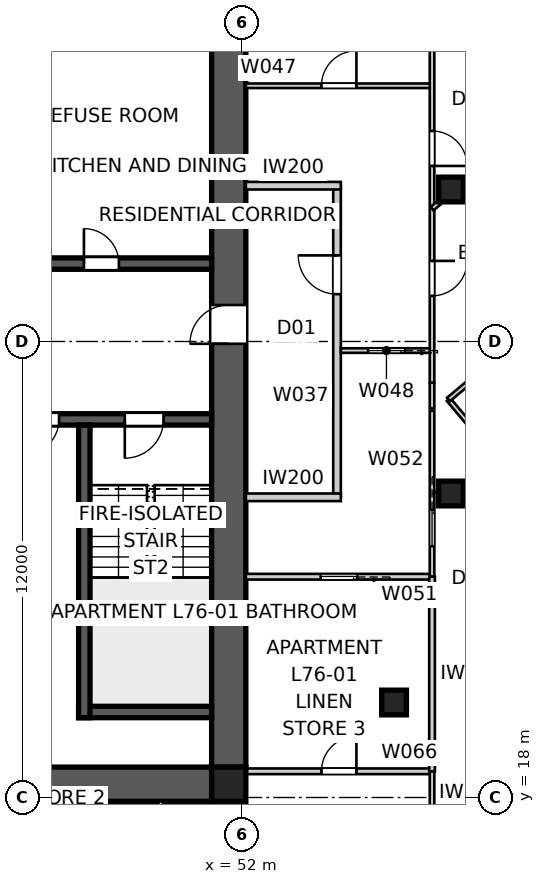
"""IFC4 building model, lengths in metres.
Left out: names, types, materials, properties, quantities, classifications, styles, units other than length and angle.
Written with IfcOpenShell. Run it as: python <this file> out.ifc"""

import sys

from ifc_helpers import new_model, si_unit, direction, frame, frame_2d, origin, origin_2d, place, context, subcontext, project, spatial, polyline, rectangle, outline, extrude, element, fill, save


model = new_model("IFC4")
c1 = context("Model", 3, precision=1e-05, world=origin(), true_north=direction((0.0, 1.0)))
c2 = subcontext(c1, "Body", "Model", "MODEL_VIEW")
j1 = project(units=[si_unit("LENGTHUNIT", "METRE"), si_unit("PLANEANGLEUNIT", "RADIAN")], contexts=[c1])
p1 = place(None, origin())
s1 = spatial("IfcSite", under=j1, at=p1, CompositionType="ELEMENT")
p2 = place(p1, origin())
s2 = spatial("IfcBuilding", under=s1, at=p2, CompositionType="ELEMENT")
p3 = place(p2, frame((0.0, 0.0, 276.0)))
s3 = spatial("IfcBuildingStorey", under=s2, at=p3, CompositionType="ELEMENT", Elevation=276.0)
p4 = place(p3, frame((51.2, 18.35, 0.0), z_axis=(0.0, 0.0, 1.0), x_axis=(-1.0, 0.0, 0.0)))
e1 = element("IfcWall", 1, at=p4, inside=s3, PredefinedType="SHEAR", context=c2, shape_type="SweptSolid", body=[
    extrude(outline(polyline([(0.0, -0.45), (22.4, -0.45), (22.4, -0.025), (22.85, -0.025), (22.85, 0.025), (22.4, 0.025), (22.4, 0.45), (0.0, 0.45), (0.0, 0.025), (-0.45, 0.025), (-0.45, -0.025), (0.0, -0.025), (0.0, -0.45)])), origin(), (0.0, 0.0, 1.0), 3.4),
])
p5 = place(p3, frame((51.65, 18.8, 0.0), z_axis=(0.0, 0.0, 1.0), x_axis=(0.0, 1.0, 0.0)))
e2 = element("IfcWall", 2, at=p5, inside=s3, PredefinedType="SHEAR", context=c2, shape_type="SweptSolid", body=[
    extrude(outline(polyline([(0.0, -0.45), (22.4, -0.45), (22.4, -0.025), (22.85, -0.025), (22.85, 0.025), (22.4, 0.025), (22.4, 0.45), (0.0, 0.45), (0.0, 0.025), (-0.45, 0.025), (-0.45, -0.025), (0.0, -0.025), (0.0, -0.45)])), origin(), (0.0, 0.0, 1.0), 3.4),
])
p6 = place(p5, frame((11.14, 0.0, 0.0)))
e3 = element("IfcOpeningElement", 3, at=p6, cuts=e2, PredefinedType="OPENING", context=c2, shape_type="SweptSolid", body=[
    extrude(rectangle(XDim=1.02, YDim=2.4, at=frame_2d((0.51, 1.2))), frame((0.0, 0.46, 0.0), z_axis=(0.0, -1.0, 0.0), x_axis=(1.0, 0.0, 0.0)), (0.0, 0.0, 1.0), 0.92),
])
p7 = place(p3, frame((28.8, 32.05, 0.0), z_axis=(0.0, 0.0, 1.0), x_axis=(1.0, 0.0, 0.0)))
e4 = element("IfcWall", 4, at=p7, inside=s3, PredefinedType="SHEAR", context=c2, shape_type="SweptSolid", body=[
    extrude(rectangle(XDim=22.4, YDim=0.3, at=frame_2d((11.2, 0.0))), origin(), (0.0, 0.0, 1.0), 3.4),
])
p8 = place(p7, frame((19.04, 0.0, 0.0)))
e5 = element("IfcOpeningElement", 5, at=p8, cuts=e4, PredefinedType="OPENING", context=c2, shape_type="SweptSolid", body=[
    extrude(rectangle(XDim=0.92, YDim=2.1, at=frame_2d((0.46, 1.05))), frame((0.0, 0.16, 0.0), z_axis=(0.0, -1.0, 0.0), x_axis=(1.0, 0.0, 0.0)), (0.0, 0.0, 1.0), 0.32),
])
p9 = place(p7, frame((1.265, 0.0, 0.0)))
e6 = element("IfcOpeningElement", 6, at=p9, cuts=e4, PredefinedType="OPENING", context=c2, shape_type="SweptSolid", body=[
    extrude(rectangle(XDim=1.02, YDim=2.1, at=frame_2d((0.51, 1.05))), frame((0.0, 0.16, 0.0), z_axis=(0.0, -1.0, 0.0), x_axis=(1.0, 0.0, 0.0)), (0.0, 0.0, 1.0), 0.32),
])
p10 = place(p7, frame((4.015, 0.0, 0.0)))
e7 = element("IfcOpeningElement", 7, at=p10, cuts=e4, PredefinedType="OPENING", context=c2, shape_type="SweptSolid", body=[
    extrude(rectangle(XDim=0.92, YDim=2.1, at=frame_2d((0.46, 1.05))), frame((0.0, 0.16, 0.0), z_axis=(0.0, -1.0, 0.0), x_axis=(1.0, 0.0, 0.0)), (0.0, 0.0, 1.0), 0.32),
])
p11 = place(p7, frame((6.115, 0.0, 0.0)))
e8 = element("IfcOpeningElement", 8, at=p11, cuts=e4, PredefinedType="OPENING", context=c2, shape_type="SweptSolid", body=[
    extrude(rectangle(XDim=0.92, YDim=2.1, at=frame_2d((0.46, 1.05))), frame((0.0, 0.16, 0.0), z_axis=(0.0, -1.0, 0.0), x_axis=(1.0, 0.0, 0.0)), (0.0, 0.0, 1.0), 0.32),
])
p12 = place(p7, frame((9.79, 0.0, 0.0)))
e9 = element("IfcOpeningElement", 9, at=p12, cuts=e4, PredefinedType="OPENING", context=c2, shape_type="SweptSolid", body=[
    extrude(rectangle(XDim=0.92, YDim=2.1, at=frame_2d((0.46, 1.05))), frame((0.0, 0.16, 0.0), z_axis=(0.0, -1.0, 0.0), x_axis=(1.0, 0.0, 0.0)), (0.0, 0.0, 1.0), 0.32),
])
p13 = place(p7, frame((12.05, 0.0, 0.0)))
e10 = element("IfcOpeningElement", 10, at=p13, cuts=e4, PredefinedType="OPENING", context=c2, shape_type="SweptSolid", body=[
    extrude(rectangle(XDim=1.1, YDim=2.1, at=frame_2d((0.55, 1.05))), frame((0.0, 0.16, 0.0), z_axis=(0.0, -1.0, 0.0), x_axis=(1.0, 0.0, 0.0)), (0.0, 0.0, 1.0), 0.32),
])
p14 = place(p7, frame((14.85, 0.0, 0.0)))
e11 = element("IfcOpeningElement", 11, at=p14, cuts=e4, PredefinedType="OPENING", context=c2, shape_type="SweptSolid", body=[
    extrude(rectangle(XDim=1.1, YDim=2.1, at=frame_2d((0.55, 1.05))), frame((0.0, 0.16, 0.0), z_axis=(0.0, -1.0, 0.0), x_axis=(1.0, 0.0, 0.0)), (0.0, 0.0, 1.0), 0.32),
])
p15 = place(p3, frame((51.2, 27.95, 0.0), z_axis=(0.0, 0.0, 1.0), x_axis=(-1.0, 0.0, 0.0)))
e12 = element("IfcWall", 12, at=p15, inside=s3, PredefinedType="SHEAR", context=c2, shape_type="SweptSolid", body=[
    extrude(rectangle(XDim=22.4, YDim=0.3, at=frame_2d((11.2, 0.0))), origin(), (0.0, 0.0, 1.0), 3.4),
])
p16 = place(p15, frame((19.04, 0.0, 0.0)))
e13 = element("IfcOpeningElement", 13, at=p16, cuts=e12, PredefinedType="OPENING", context=c2, shape_type="SweptSolid", body=[
    extrude(rectangle(XDim=0.92, YDim=2.1, at=frame_2d((0.46, 1.05))), frame((0.0, 0.16, 0.0), z_axis=(0.0, -1.0, 0.0), x_axis=(1.0, 0.0, 0.0)), (0.0, 0.0, 1.0), 0.32),
])
p17 = place(p15, frame((1.265, 0.0, 0.0)))
e14 = element("IfcOpeningElement", 14, at=p17, cuts=e12, PredefinedType="OPENING", context=c2, shape_type="SweptSolid", body=[
    extrude(rectangle(XDim=1.02, YDim=2.1, at=frame_2d((0.51, 1.05))), frame((0.0, 0.16, 0.0), z_axis=(0.0, -1.0, 0.0), x_axis=(1.0, 0.0, 0.0)), (0.0, 0.0, 1.0), 0.32),
])
p18 = place(p15, frame((4.015, 0.0, 0.0)))
e15 = element("IfcOpeningElement", 15, at=p18, cuts=e12, PredefinedType="OPENING", context=c2, shape_type="SweptSolid", body=[
    extrude(rectangle(XDim=0.92, YDim=2.1, at=frame_2d((0.46, 1.05))), frame((0.0, 0.16, 0.0), z_axis=(0.0, -1.0, 0.0), x_axis=(1.0, 0.0, 0.0)), (0.0, 0.0, 1.0), 0.32),
])
p19 = place(p15, frame((9.34, 0.0, 0.0)))
e16 = element("IfcOpeningElement", 16, at=p19, cuts=e12, PredefinedType="OPENING", context=c2, shape_type="SweptSolid", body=[
    extrude(rectangle(XDim=0.92, YDim=2.1, at=frame_2d((0.46, 1.05))), frame((0.0, 0.16, 0.0), z_axis=(0.0, -1.0, 0.0), x_axis=(1.0, 0.0, 0.0)), (0.0, 0.0, 1.0), 0.32),
])
p20 = place(p15, frame((7.015, 0.0, 0.0)))
e17 = element("IfcOpeningElement", 17, at=p20, cuts=e12, PredefinedType="OPENING", context=c2, shape_type="SweptSolid", body=[
    extrude(rectangle(XDim=0.92, YDim=2.1, at=frame_2d((0.46, 1.05))), frame((0.0, 0.16, 0.0), z_axis=(0.0, -1.0, 0.0), x_axis=(1.0, 0.0, 0.0)), (0.0, 0.0, 1.0), 0.32),
])
p21 = place(p15, frame((12.05, 0.0, 0.0)))
e18 = element("IfcOpeningElement", 18, at=p21, cuts=e12, PredefinedType="OPENING", context=c2, shape_type="SweptSolid", body=[
    extrude(rectangle(XDim=1.1, YDim=2.1, at=frame_2d((0.55, 1.05))), frame((0.0, 0.16, 0.0), z_axis=(0.0, -1.0, 0.0), x_axis=(1.0, 0.0, 0.0)), (0.0, 0.0, 1.0), 0.32),
])
p22 = place(p15, frame((14.85, 0.0, 0.0)))
e19 = element("IfcOpeningElement", 19, at=p22, cuts=e12, PredefinedType="OPENING", context=c2, shape_type="SweptSolid", body=[
    extrude(rectangle(XDim=1.1, YDim=2.1, at=frame_2d((0.55, 1.05))), frame((0.0, 0.16, 0.0), z_axis=(0.0, -1.0, 0.0), x_axis=(1.0, 0.0, 0.0)), (0.0, 0.0, 1.0), 0.32),
])
p23 = place(p3, frame((47.85, 27.8, 0.0), z_axis=(0.0, 0.0, 1.0), x_axis=(0.0, -1.0, 0.0)))
e20 = element("IfcWall", 20, at=p23, inside=s3, PredefinedType="SHEAR", context=c2, shape_type="SweptSolid", body=[
    extrude(rectangle(XDim=7.7, YDim=0.3, at=frame_2d((3.85, 0.0))), origin(), (0.0, 0.0, 1.0), 3.4),
])
p24 = place(p3, frame((51.2, 20.25, 0.0), z_axis=(0.0, 0.0, 1.0), x_axis=(-1.0, 0.0, 0.0)))
e21 = element("IfcWall", 21, at=p24, inside=s3, PredefinedType="SHEAR", context=c2, shape_type="SweptSolid", body=[
    extrude(rectangle(XDim=3.5, YDim=0.3, at=frame_2d((1.75, 0.0))), origin(), (0.0, 0.0, 1.0), 3.4),
])
p25 = place(p3, frame((51.65, 18.35, 0.0), z_axis=(0.0, 0.0, 1.0), x_axis=(1.0, 0.0, 0.0)))
e22 = element("IfcColumn", 22, at=p25, inside=s3, PredefinedType="COLUMN", context=c2, shape_type="SweptSolid", body=[
    extrude(rectangle(XDim=0.9, YDim=0.9, at=origin_2d()), origin(), (0.0, 0.0, 1.0), 3.4),
])
for number, where, z_axis, x_axis in (
    (23, (57.5, 26.0, 0.0), (0.0, 0.0, 1.0), (1.0, 0.0, 0.0)),
    (24, (57.5, 34.0, 0.0), (0.0, 0.0, 1.0), (1.0, 0.0, 0.0)),
    (25, (56.0, 20.5, 0.0), (0.0, 0.0, 1.0), (1.0, 0.0, 0.0)),
):
    element("IfcColumn", number, at=place(p3, frame(where, z_axis=z_axis, x_axis=x_axis)), inside=s3, PredefinedType="COLUMN", context=c2, shape_type="SweptSolid", body=[
        extrude(rectangle(XDim=0.65, YDim=0.65, at=origin_2d()), origin(), (0.0, 0.0, 1.0), 3.4),
    ])
p26 = place(p3, frame((54.5, 25.9, 0.0), z_axis=(0.0, 0.0, 1.0), x_axis=(0.0, 1.0, 0.0)))
e26 = element("IfcWall", 26, at=p26, inside=s3, PredefinedType="PARTITIONING", context=c2, shape_type="SweptSolid", body=[
    extrude(rectangle(XDim=8.2, YDim=0.2, at=frame_2d((4.1, 0.0))), origin(), (0.0, 0.0, 1.0), 3.25),
])
p27 = place(p26, frame((5.346, 0.0, 0.0)))
e27 = element("IfcOpeningElement", 27, at=p27, cuts=e26, PredefinedType="OPENING", context=c2, shape_type="SweptSolid", body=[
    extrude(rectangle(XDim=1.02, YDim=2.34, at=frame_2d((0.51, 1.17))), frame((0.0, 0.11, 0.0), z_axis=(0.0, -1.0, 0.0), x_axis=(1.0, 0.0, 0.0)), (0.0, 0.0, 1.0), 0.22),
])
for number, where, z_axis, x_axis in (
    (28, (52.1, 34.1, 0.0), (0.0, 0.0, 1.0), (1.0, 0.0, 0.0)),
    (29, (52.1, 25.9, 0.0), (0.0, 0.0, 1.0), (1.0, 0.0, 0.0)),
):
    element("IfcWall", number, at=place(p3, frame(where, z_axis=z_axis, x_axis=x_axis)), inside=s3, PredefinedType="PARTITIONING", context=c2, shape_type="SweptSolid", body=[
        extrude(rectangle(XDim=2.5, YDim=0.2, at=frame_2d((1.25, 0.0))), origin(), (0.0, 0.0, 1.0), 3.25),
    ])
p28 = place(p3, frame((52.1, 36.73, 0.0), z_axis=(0.0, 0.0, 1.0), x_axis=(1.0, 0.0, 0.0)))
e30 = element("IfcWall", 30, at=p28, inside=s3, PredefinedType="PARTITIONING", context=c2, shape_type="SweptSolid", body=[
    extrude(rectangle(XDim=4.9, YDim=0.12, at=frame_2d((2.45, 0.0))), origin(), (0.0, 0.0, 1.0), 3.25),
])
p29 = place(p28, frame((1.99, 0.0, 0.0)))
e31 = element("IfcOpeningElement", 31, at=p29, cuts=e30, PredefinedType="OPENING", context=c2, shape_type="SweptSolid", body=[
    extrude(rectangle(XDim=0.92, YDim=2.34, at=frame_2d((0.46, 1.17))), frame((0.0, 0.07, 0.0), z_axis=(0.0, -1.0, 0.0), x_axis=(1.0, 0.0, 0.0)), (0.0, 0.0, 1.0), 0.14),
])
p30 = place(p3, frame((57.0, 29.761, 0.0), z_axis=(0.0, 0.0, 1.0), x_axis=(-1.0, 0.0, 0.0)))
e32 = element("IfcWall", 32, at=p30, inside=s3, PredefinedType="PARTITIONING", context=c2, shape_type="SweptSolid", body=[
    extrude(rectangle(XDim=2.4, YDim=0.12, at=frame_2d((1.2, 0.0))), origin(), (0.0, 0.0, 1.0), 3.25),
])
p31 = place(p30, frame((0.72, 0.0, 0.0)))
e33 = element("IfcOpeningElement", 33, at=p31, cuts=e32, PredefinedType="OPENING", context=c2, shape_type="SweptSolid", body=[
    extrude(rectangle(XDim=0.96, YDim=2.1, at=frame_2d((0.48, 1.05))), frame((0.0, 0.07, 0.0), z_axis=(0.0, -1.0, 0.0), x_axis=(1.0, 0.0, 0.0)), (0.0, 0.0, 1.0), 0.14),
])
p32 = place(p3, frame((57.0, 41.57, 0.0), z_axis=(0.0, 0.0, 1.0), x_axis=(0.0, -1.0, 0.0)))
e34 = element("IfcWall", 34, at=p32, inside=s3, PredefinedType="PARTITIONING", context=c2, shape_type="SweptSolid", body=[
    extrude(rectangle(XDim=12.656, YDim=0.12, at=frame_2d((6.328, 0.0))), origin(), (0.0, 0.0, 1.0), 2.549),
])
p33 = place(p32, frame((9.449, 0.0, 0.0)))
e35 = element("IfcOpeningElement", 35, at=p33, cuts=e34, PredefinedType="OPENING", context=c2, shape_type="SweptSolid", body=[
    extrude(rectangle(XDim=0.92, YDim=2.34, at=frame_2d((0.46, 1.17))), frame((0.0, 0.07, 0.0), z_axis=(0.0, -1.0, 0.0), x_axis=(1.0, 0.0, 0.0)), (0.0, 0.0, 1.0), 0.14),
])
p34 = place(p32, frame((6.031, 0.0, 0.0)))
e36 = element("IfcOpeningElement", 36, at=p34, cuts=e34, PredefinedType="OPENING", context=c2, shape_type="SweptSolid", body=[
    extrude(rectangle(XDim=0.92, YDim=2.34, at=frame_2d((0.46, 1.17))), frame((0.0, 0.07, 0.0), z_axis=(0.0, -1.0, 0.0), x_axis=(1.0, 0.0, 0.0)), (0.0, 0.0, 1.0), 0.14),
])
p35 = place(p3, frame((57.0, 23.81, 0.0), z_axis=(0.0, 0.0, 1.0), x_axis=(-1.0, 0.0, 0.0)))
e37 = element("IfcWall", 37, at=p35, inside=s3, PredefinedType="SOLIDWALL", context=c2, shape_type="SweptSolid", body=[
    extrude(rectangle(XDim=4.9, YDim=0.15, at=frame_2d((2.45, 0.0))), origin(), (0.0, 0.0, 1.0), 3.25),
])
p36 = place(p35, frame((1.97, 0.0, 0.0)))
e38 = element("IfcOpeningElement", 38, at=p36, cuts=e37, PredefinedType="OPENING", context=c2, shape_type="SweptSolid", body=[
    extrude(rectangle(XDim=0.96, YDim=2.1, at=frame_2d((0.48, 1.05))), frame((0.0, 0.085, 0.0), z_axis=(0.0, -1.0, 0.0), x_axis=(1.0, 0.0, 0.0)), (0.0, 0.0, 1.0), 0.17),
])
p37 = place(p3, frame((57.0, 28.176, 0.0), z_axis=(0.0, 0.0, 1.0), x_axis=(0.0, -1.0, 0.0)))
e39 = element("IfcWall", 39, at=p37, inside=s3, PredefinedType="PARTITIONING", context=c2, shape_type="SweptSolid", body=[
    extrude(rectangle(XDim=4.365, YDim=0.12, at=frame_2d((2.183, 0.0))), origin(), (0.0, 0.0, 1.0), 2.549),
])
p38 = place(p37, frame((2.603, 0.0, 0.0)))
e40 = element("IfcOpeningElement", 40, at=p38, cuts=e39, PredefinedType="OPENING", context=c2, shape_type="SweptSolid", body=[
    extrude(rectangle(XDim=0.96, YDim=2.1, at=frame_2d((0.48, 1.05))), frame((0.0, 0.07, 0.0), z_axis=(0.0, -1.0, 0.0), x_axis=(1.0, 0.0, 0.0)), (0.0, 0.0, 1.0), 0.14),
])
p39 = place(p3, frame((49.86, 17.9, 0.0), z_axis=(0.0, 0.0, 1.0), x_axis=(0.0, -1.0, 0.0)))
e41 = element("IfcWall", 41, at=p39, inside=s3, PredefinedType="PARTITIONING", context=c2, shape_type="SweptSolid", body=[
    extrude(rectangle(XDim=4.9, YDim=0.12, at=frame_2d((2.45, 0.0))), origin(), (0.0, 0.0, 1.0), 3.25),
])
p40 = place(p39, frame((1.97, 0.0, 0.0)))
e42 = element("IfcOpeningElement", 42, at=p40, cuts=e41, PredefinedType="OPENING", context=c2, shape_type="SweptSolid", body=[
    extrude(rectangle(XDim=0.96, YDim=2.1, at=frame_2d((0.48, 1.05))), frame((0.0, 0.07, 0.0), z_axis=(0.0, -1.0, 0.0), x_axis=(1.0, 0.0, 0.0)), (0.0, 0.0, 1.0), 0.14),
])
p41 = place(p3, frame((51.18, 18.689, 0.0), z_axis=(0.0, 0.0, 1.0), x_axis=(1.0, 0.0, 0.0)))
e43 = element("IfcWall", 43, at=p41, inside=s3, PredefinedType="SOLIDWALL", context=c2, shape_type="SweptSolid", body=[
    extrude(rectangle(XDim=5.82, YDim=0.15, at=frame_2d((2.91, 0.0))), origin(), (0.0, 0.0, 1.0), 3.25),
])
p42 = place(p41, frame((2.91, 0.0, 0.0)))
e44 = element("IfcOpeningElement", 44, at=p42, cuts=e43, PredefinedType="OPENING", context=c2, shape_type="SweptSolid", body=[
    extrude(rectangle(XDim=0.92, YDim=2.1, at=frame_2d((0.46, 1.05))), frame((0.0, 0.085, 0.0), z_axis=(0.0, -1.0, 0.0), x_axis=(1.0, 0.0, 0.0)), (0.0, 0.0, 1.0), 0.17),
])
p43 = place(p3, frame((57.0, 18.689, 0.0), z_axis=(0.0, 0.0, 1.0), x_axis=(0.0, -1.0, 0.0)))
e45 = element("IfcWall", 45, at=p43, inside=s3, PredefinedType="PARTITIONING", context=c2, shape_type="SweptSolid", body=[
    extrude(rectangle(XDim=1.133, YDim=0.12, at=frame_2d((0.567, 0.0))), origin(), (0.0, 0.0, 1.0), 3.25),
])
p44 = place(p3, frame((57.0, 23.81, 0.0), z_axis=(0.0, 0.0, 1.0), x_axis=(0.0, -1.0, 0.0)))
e46 = element("IfcWall", 46, at=p44, inside=s3, PredefinedType="SOLIDWALL", context=c2, shape_type="SweptSolid", body=[
    extrude(rectangle(XDim=5.121, YDim=0.15, at=frame_2d((2.56, 0.0))), origin(), (0.0, 0.0, 1.0), 3.25),
])
p45 = place(p3, frame((62.631, 22.281, 0.0), z_axis=(0.0, 0.0, 1.0), x_axis=(-0.642800378028, 0.766033729027, 0.0)))
e47 = element("IfcWall", 47, at=p45, inside=s3, PredefinedType="PARTITIONING", context=c2, shape_type="SweptSolid", body=[
    extrude(rectangle(XDim=8.085, YDim=0.12, at=frame_2d((4.042, 0.0))), origin(), (0.0, 0.0, 1.0), 3.25),
])
p46 = place(p3, frame((57.434, 28.475, 0.0), z_axis=(0.0, 0.0, 1.0), x_axis=(0.766033729027, 0.642800378028, 0.0)))
e48 = element("IfcWall", 48, at=p46, inside=s3, PredefinedType="PARTITIONING", context=c2, shape_type="SweptSolid", body=[
    extrude(rectangle(XDim=8.085, YDim=0.12, at=frame_2d((4.042, 0.0))), origin(), (0.0, 0.0, 1.0), 3.25),
])
p47 = place(p46, frame((1.603, 0.0, 0.0)))
e49 = element("IfcOpeningElement", 49, at=p47, cuts=e48, PredefinedType="OPENING", context=c2, shape_type="SweptSolid", body=[
    extrude(rectangle(XDim=0.92, YDim=2.34, at=frame_2d((0.46, 1.17))), frame((0.0, 0.07, 0.0), z_axis=(0.0, -1.0, 0.0), x_axis=(1.0, 0.0, 0.0)), (0.0, 0.0, 1.0), 0.14),
])
p48 = place(p46, frame((5.64, 0.0, 0.0)))
e50 = element("IfcOpeningElement", 50, at=p48, cuts=e48, PredefinedType="OPENING", context=c2, shape_type="SweptSolid", body=[
    extrude(rectangle(XDim=0.92, YDim=2.34, at=frame_2d((0.46, 1.17))), frame((0.0, 0.07, 0.0), z_axis=(0.0, -1.0, 0.0), x_axis=(1.0, 0.0, 0.0)), (0.0, 0.0, 1.0), 0.14),
])
p49 = place(p3, frame((57.0, 33.495, 0.0), z_axis=(0.0, 0.0, 1.0), x_axis=(0.76605407051, 0.642776136034, 0.0)))
e51 = element("IfcWall", 51, at=p49, inside=s3, PredefinedType="PARTITIONING", context=c2, shape_type="SweptSolid", body=[
    extrude(rectangle(XDim=5.191, YDim=0.12, at=frame_2d((2.595, 0.0))), origin(), (0.0, 0.0, 1.0), 3.25),
])
p50 = place(p3, frame((57.0, 28.915, 0.0), z_axis=(0.0, 0.0, 1.0), x_axis=(0.0, -1.0, 0.0)))
e52 = element("IfcWall", 52, at=p50, inside=s3, PredefinedType="PARTITIONING", context=c2, shape_type="SweptSolid", body=[
    extrude(rectangle(XDim=0.676, YDim=0.12, at=frame_2d((0.338, 0.0))), origin(), (0.0, 0.0, 1.0), 3.25),
])
p51 = place(p8, origin())
e53 = element("IfcDoor", 53, at=p51, inside=s3, OperationType="SINGLE_SWING_LEFT", PredefinedType="DOOR", context=c2, shape_type="SweptSolid", body=[
    extrude(rectangle(XDim=0.92, YDim=2.1, at=frame_2d((0.46, 1.05))), frame((0.0, 0.025, 0.0), z_axis=(0.0, -1.0, 0.0), x_axis=(1.0, 0.0, 0.0)), (0.0, 0.0, 1.0), 0.05),
])
fill(e5, e53)
p52 = place(p17, origin())
e54 = element("IfcDoor", 54, at=p52, inside=s3, OperationType="SINGLE_SWING_RIGHT", PredefinedType="DOOR", context=c2, shape_type="SweptSolid", body=[
    extrude(rectangle(XDim=1.02, YDim=2.1, at=frame_2d((0.51, 1.05))), frame((0.0, 0.025, 0.0), z_axis=(0.0, -1.0, 0.0), x_axis=(1.0, 0.0, 0.0)), (0.0, 0.0, 1.0), 0.05),
])
fill(e14, e54)
p53 = place(p18, origin())
e55 = element("IfcDoor", 55, at=p53, inside=s3, OperationType="SINGLE_SWING_RIGHT", PredefinedType="DOOR", context=c2, shape_type="SweptSolid", body=[
    extrude(rectangle(XDim=0.92, YDim=2.1, at=frame_2d((0.46, 1.05))), frame((0.0, 0.025, 0.0), z_axis=(0.0, -1.0, 0.0), x_axis=(1.0, 0.0, 0.0)), (0.0, 0.0, 1.0), 0.05),
])
fill(e15, e55)
p54 = place(p27, origin())
e56 = element("IfcDoor", 56, at=p54, inside=s3, OperationType="SINGLE_SWING_RIGHT", PredefinedType="DOOR", context=c2, shape_type="SweptSolid", body=[
    extrude(rectangle(XDim=1.02, YDim=2.34, at=frame_2d((0.51, 1.17))), frame((0.0, 0.025, 0.0), z_axis=(0.0, -1.0, 0.0), x_axis=(1.0, 0.0, 0.0)), (0.0, 0.0, 1.0), 0.05),
])
fill(e27, e56)
p55 = place(p29, origin())
e57 = element("IfcDoor", 57, at=p55, inside=s3, OperationType="SINGLE_SWING_RIGHT", PredefinedType="DOOR", context=c2, shape_type="SweptSolid", body=[
    extrude(rectangle(XDim=0.92, YDim=2.34, at=frame_2d((0.46, 1.17))), frame((0.0, 0.025, 0.0), z_axis=(0.0, -1.0, 0.0), x_axis=(1.0, 0.0, 0.0)), (0.0, 0.0, 1.0), 0.05),
])
fill(e31, e57)
p56 = place(p33, origin())
e58 = element("IfcDoor", 58, at=p56, inside=s3, OperationType="SINGLE_SWING_LEFT", PredefinedType="DOOR", context=c2, shape_type="SweptSolid", body=[
    extrude(rectangle(XDim=0.92, YDim=2.34, at=frame_2d((0.46, 1.17))), frame((0.0, 0.025, 0.0), z_axis=(0.0, -1.0, 0.0), x_axis=(1.0, 0.0, 0.0)), (0.0, 0.0, 1.0), 0.05),
])
fill(e35, e58)
p57 = place(p34, origin())
e59 = element("IfcDoor", 59, at=p57, inside=s3, OperationType="SINGLE_SWING_RIGHT", PredefinedType="DOOR", context=c2, shape_type="SweptSolid", body=[
    extrude(rectangle(XDim=0.92, YDim=2.34, at=frame_2d((0.46, 1.17))), frame((0.0, 0.025, 0.0), z_axis=(0.0, -1.0, 0.0), x_axis=(1.0, 0.0, 0.0)), (0.0, 0.0, 1.0), 0.05),
])
fill(e36, e59)
p58 = place(p31, origin())
e60 = element("IfcDoor", 60, at=p58, inside=s3, OperationType="SLIDING_TO_LEFT", PredefinedType="DOOR", context=c2, shape_type="SweptSolid", body=[
    extrude(rectangle(XDim=0.96, YDim=2.1, at=frame_2d((0.48, 1.05))), frame((0.0, 0.025, 0.0), z_axis=(0.0, -1.0, 0.0), x_axis=(1.0, 0.0, 0.0)), (0.0, 0.0, 1.0), 0.05),
])
fill(e33, e60)
p59 = place(p36, origin())
e61 = element("IfcDoor", 61, at=p59, inside=s3, OperationType="SLIDING_TO_LEFT", PredefinedType="DOOR", context=c2, shape_type="SweptSolid", body=[
    extrude(rectangle(XDim=0.96, YDim=2.1, at=frame_2d((0.48, 1.05))), frame((0.0, 0.025, 0.0), z_axis=(0.0, -1.0, 0.0), x_axis=(1.0, 0.0, 0.0)), (0.0, 0.0, 1.0), 0.05),
])
fill(e38, e61)
p60 = place(p38, origin())
e62 = element("IfcDoor", 62, at=p60, inside=s3, OperationType="SLIDING_TO_LEFT", PredefinedType="DOOR", context=c2, shape_type="SweptSolid", body=[
    extrude(rectangle(XDim=0.96, YDim=2.1, at=frame_2d((0.48, 1.05))), frame((0.0, 0.025, 0.0), z_axis=(0.0, -1.0, 0.0), x_axis=(1.0, 0.0, 0.0)), (0.0, 0.0, 1.0), 0.05),
])
fill(e40, e62)
p61 = place(p42, origin())
e63 = element("IfcDoor", 63, at=p61, inside=s3, OperationType="SINGLE_SWING_RIGHT", PredefinedType="DOOR", context=c2, shape_type="SweptSolid", body=[
    extrude(rectangle(XDim=0.92, YDim=2.1, at=frame_2d((0.46, 1.05))), frame((0.0, 0.025, 0.0), z_axis=(0.0, -1.0, 0.0), x_axis=(1.0, 0.0, 0.0)), (0.0, 0.0, 1.0), 0.05),
])
fill(e44, e63)
p62 = place(p6, origin())
e64 = element("IfcDoor", 64, at=p62, inside=s3, OperationType="SINGLE_SWING_LEFT", PredefinedType="DOOR", context=c2, shape_type="SweptSolid", body=[
    extrude(rectangle(XDim=1.02, YDim=2.4, at=frame_2d((0.51, 1.2))), frame((0.0, 0.025, 0.0), z_axis=(0.0, -1.0, 0.0), x_axis=(1.0, 0.0, 0.0)), (0.0, 0.0, 1.0), 0.05),
])
fill(e3, e64)
save(model, sys.argv[1])
